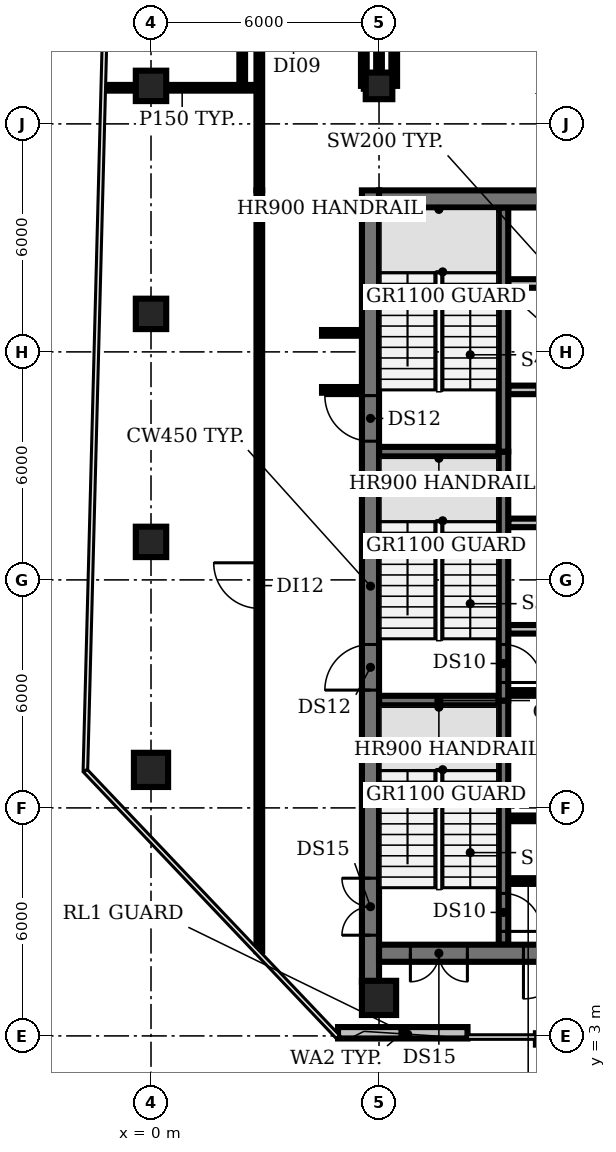
"""IFC4 building model, lengths in metres.
Left out: names, types, materials, properties, quantities, classifications, styles, units other than length and angle.
Written with IfcOpenShell. Run it as: python <this file> out.ifc"""

import sys

from ifc_helpers import new_model, si_unit, direction, frame, frame_2d, origin, origin_2d, place, context, subcontext, project, spatial, rectangle, circle, extrude, element, fill, save


model = new_model("IFC4")
c1 = context("Model", 3, precision=1e-05, world=origin(), true_north=direction((0.0, 1.0)))
c2 = subcontext(c1, "Body", "Model", "MODEL_VIEW")
j1 = project(units=[si_unit("LENGTHUNIT", "METRE"), si_unit("PLANEANGLEUNIT", "RADIAN")], contexts=[c1])
p1 = place(None, origin())
s1 = spatial("IfcSite", under=j1, at=p1, CompositionType="ELEMENT")
p2 = place(p1, origin())
s2 = spatial("IfcBuilding", under=s1, at=p2, CompositionType="ELEMENT")
p3 = place(p2, frame((0.0, 0.0, 234.8)))
s3 = spatial("IfcBuildingStorey", under=s2, at=p3, CompositionType="ELEMENT", Elevation=234.8)
p4 = place(p3, frame((0.0, 10.0, 0.0), z_axis=(0.0, 0.0, 1.0), x_axis=(1.0, 0.0, 0.0)))
e1 = element("IfcColumn", 1, at=p4, inside=s3, PredefinedType="COLUMN", context=c2, shape_type="SweptSolid", body=[
    extrude(circle(Radius=0.45, at=origin_2d()), origin(), (0.0, 0.0, 1.0), 3.85),
])
for number, where, z_axis, x_axis in (
    (2, (0.0, 16.0, 0.0), (0.0, 0.0, 1.0), (1.0, 0.0, 0.0)),
    (3, (0.0, 22.0, 0.0), (0.0, 0.0, 1.0), (1.0, 0.0, 0.0)),
    (4, (0.0, 28.0, 0.0), (0.0, 0.0, 1.0), (1.0, 0.0, 0.0)),
):
    element("IfcColumn", number, at=place(p3, frame(where, z_axis=z_axis, x_axis=x_axis)), inside=s3, PredefinedType="COLUMN", context=c2, shape_type="SweptSolid", body=[
        extrude(rectangle(XDim=0.8, YDim=0.8, at=origin_2d()), origin(), (0.0, 0.0, 1.0), 3.85),
    ])
p5 = place(p3, frame((6.0, 4.0, 0.0), z_axis=(0.0, 0.0, 1.0), x_axis=(1.0, 0.0, 0.0)))
e5 = element("IfcColumn", 5, at=p5, inside=s3, PredefinedType="COLUMN", context=c2, shape_type="SweptSolid", body=[
    extrude(circle(Radius=0.45, at=origin_2d()), origin(), (0.0, 0.0, 1.0), 3.85),
])
p6 = place(p3, frame((6.0, 28.0, 0.0), z_axis=(0.0, 0.0, 1.0), x_axis=(1.0, 0.0, 0.0)))
e6 = element("IfcColumn", 6, at=p6, inside=s3, PredefinedType="COLUMN", context=c2, shape_type="SweptSolid", body=[
    extrude(rectangle(XDim=0.7, YDim=0.7, at=origin_2d()), origin(), (0.0, 0.0, 1.0), 3.85),
])
p7 = place(p3, frame((4.921, 3.083, 0.0), z_axis=(0.0, 0.0, 1.0), x_axis=(1.0, 0.0, 0.0)))
e7 = element("IfcWall", 7, at=p7, inside=s3, PredefinedType="SOLIDWALL", context=c2, shape_type="SweptSolid", body=[
    extrude(rectangle(XDim=3.407, YDim=0.3, at=frame_2d((1.704, 0.0))), origin(), (0.0, 0.0, 1.0), 3.85),
])
p8 = place(p3, frame((10.128, 2.92, 0.0), z_axis=(0.0, 0.0, 1.0), x_axis=(1.0, 0.0, 0.0)))
e8 = element("IfcWall", 8, at=p8, inside=s3, PredefinedType="SOLIDWALL", context=c2, shape_type="SweptSolid", body=[
    extrude(rectangle(XDim=3.407, YDim=0.3, at=frame_2d((1.704, 0.0))), origin(), (0.0, 0.0, 1.0), 3.85),
])
for number, where, z_axis, x_axis in (
    (9, (9.4, 7.075, 0.0), (0.0, 0.0, 1.0), (1.0, 0.0, 0.0)),
    (10, (9.4, 8.725, 0.0), (0.0, 0.0, 1.0), (1.0, 0.0, 0.0)),
    (11, (9.4, 10.375, 0.0), (0.0, 0.0, 1.0), (1.0, 0.0, 0.0)),
):
    element("IfcWall", number, at=place(p3, frame(where, z_axis=z_axis, x_axis=x_axis)), inside=s3, PredefinedType="SHEAR", context=c2, shape_type="SweptSolid", body=[
        extrude(rectangle(XDim=1.05, YDim=0.15, at=frame_2d((0.525, 0.0))), origin(), (0.0, 0.0, 1.0), 3.85),
    ])
p9 = place(p3, frame((6.0, 11.825, 0.0), z_axis=(0.0, 0.0, 1.0), x_axis=(1.0, 0.0, 0.0)))
e12 = element("IfcWall", 12, at=p9, inside=s3, PredefinedType="SHEAR", context=c2, shape_type="SweptSolid", body=[
    extrude(rectangle(XDim=3.15, YDim=0.25, at=frame_2d((1.575, 0.0))), origin(), (0.0, 0.0, 1.0), 3.85),
])
p10 = place(p3, frame((9.4, 12.025, 0.0), z_axis=(0.0, 0.0, 1.0), x_axis=(1.0, 0.0, 0.0)))
e13 = element("IfcWall", 13, at=p10, inside=s3, PredefinedType="SHEAR", context=c2, shape_type="SweptSolid", body=[
    extrude(rectangle(XDim=1.05, YDim=0.15, at=frame_2d((0.525, 0.0))), origin(), (0.0, 0.0, 1.0), 3.85),
])
p11 = place(p3, frame((9.4, 13.7, 0.0), z_axis=(0.0, 0.0, 1.0), x_axis=(1.0, 0.0, 0.0)))
e14 = element("IfcWall", 14, at=p11, inside=s3, PredefinedType="PARTITIONING", context=c2, shape_type="SweptSolid", body=[
    extrude(rectangle(XDim=4.0, YDim=0.225, at=frame_2d((2.0, 0.0))), origin(), (0.0, 0.0, 1.0), 3.85),
])
p12 = place(p3, frame((9.4, 16.5, 0.0), z_axis=(0.0, 0.0, 1.0), x_axis=(1.0, 0.0, 0.0)))
e15 = element("IfcWall", 15, at=p12, inside=s3, PredefinedType="PARTITIONING", context=c2, shape_type="SweptSolid", body=[
    extrude(rectangle(XDim=14.6, YDim=0.225, at=frame_2d((7.3, 0.0))), origin(), (0.0, 0.0, 1.0), 3.85),
])
p13 = place(p12, frame((1.6, 0.0, 0.0)))
e16 = element("IfcOpeningElement", 16, at=p13, cuts=e15, PredefinedType="OPENING", context=c2, shape_type="SweptSolid", body=[
    extrude(rectangle(XDim=1.0, YDim=2.1, at=frame_2d((0.5, 1.05))), frame((0.0, 0.123, 0.0), z_axis=(0.0, -1.0, 0.0), x_axis=(1.0, 0.0, 0.0)), (0.0, 0.0, 1.0), 0.245),
])
p14 = place(p12, frame((5.125, 0.0, 0.0)))
e17 = element("IfcOpeningElement", 17, at=p14, cuts=e15, PredefinedType="OPENING", context=c2, shape_type="SweptSolid", body=[
    extrude(rectangle(XDim=0.9, YDim=2.1, at=frame_2d((0.45, 1.05))), frame((0.0, 0.123, 0.0), z_axis=(0.0, -1.0, 0.0), x_axis=(1.0, 0.0, 0.0)), (0.0, 0.0, 1.0), 0.245),
])
p15 = place(p12, frame((7.675, 0.0, 0.0)))
e18 = element("IfcOpeningElement", 18, at=p15, cuts=e15, PredefinedType="OPENING", context=c2, shape_type="SweptSolid", body=[
    extrude(rectangle(XDim=0.9, YDim=2.1, at=frame_2d((0.45, 1.05))), frame((0.0, 0.123, 0.0), z_axis=(0.0, -1.0, 0.0), x_axis=(1.0, 0.0, 0.0)), (0.0, 0.0, 1.0), 0.245),
])
p16 = place(p12, frame((9.775, 0.0, 0.0)))
e19 = element("IfcOpeningElement", 19, at=p16, cuts=e15, PredefinedType="OPENING", context=c2, shape_type="SweptSolid", body=[
    extrude(rectangle(XDim=0.9, YDim=2.1, at=frame_2d((0.45, 1.05))), frame((0.0, 0.123, 0.0), z_axis=(0.0, -1.0, 0.0), x_axis=(1.0, 0.0, 0.0)), (0.0, 0.0, 1.0), 0.245),
])
p17 = place(p12, frame((12.4, 0.0, 0.0)))
e20 = element("IfcOpeningElement", 20, at=p17, cuts=e15, PredefinedType="OPENING", context=c2, shape_type="SweptSolid", body=[
    extrude(rectangle(XDim=1.0, YDim=2.1, at=frame_2d((0.5, 1.05))), frame((0.0, 0.123, 0.0), z_axis=(0.0, -1.0, 0.0), x_axis=(1.0, 0.0, 0.0)), (0.0, 0.0, 1.0), 0.245),
])
p18 = place(p3, frame((6.0, 18.375, 0.0), z_axis=(0.0, 0.0, 1.0), x_axis=(1.0, 0.0, 0.0)))
e21 = element("IfcWall", 21, at=p18, inside=s3, PredefinedType="SHEAR", context=c2, shape_type="SweptSolid", body=[
    extrude(rectangle(XDim=3.15, YDim=0.25, at=frame_2d((1.575, 0.0))), origin(), (0.0, 0.0, 1.0), 3.85),
])
p19 = place(p3, frame((24.0, 20.0, 0.0), z_axis=(0.0, 0.0, 1.0), x_axis=(-1.0, 0.0, 0.0)))
e22 = element("IfcWall", 22, at=p19, inside=s3, PredefinedType="PARTITIONING", context=c2, shape_type="SweptSolid", body=[
    extrude(rectangle(XDim=14.6, YDim=0.225, at=frame_2d((7.3, 0.0))), origin(), (0.0, 0.0, 1.0), 3.85),
])
p20 = place(p19, frame((12.75, 0.0, 0.0)))
e23 = element("IfcOpeningElement", 23, at=p20, cuts=e22, PredefinedType="OPENING", context=c2, shape_type="SweptSolid", body=[
    extrude(rectangle(XDim=1.1, YDim=2.1, at=frame_2d((0.55, 1.05))), frame((0.0, 0.123, 0.0), z_axis=(0.0, -1.0, 0.0), x_axis=(1.0, 0.0, 0.0)), (0.0, 0.0, 1.0), 0.245),
])
p21 = place(p19, frame((9.95, 0.0, 0.0)))
e24 = element("IfcOpeningElement", 24, at=p21, cuts=e22, PredefinedType="OPENING", context=c2, shape_type="SweptSolid", body=[
    extrude(rectangle(XDim=1.1, YDim=2.1, at=frame_2d((0.55, 1.05))), frame((0.0, 0.123, 0.0), z_axis=(0.0, -1.0, 0.0), x_axis=(1.0, 0.0, 0.0)), (0.0, 0.0, 1.0), 0.245),
])
p22 = place(p19, frame((7.15, 0.0, 0.0)))
e25 = element("IfcOpeningElement", 25, at=p22, cuts=e22, PredefinedType="OPENING", context=c2, shape_type="SweptSolid", body=[
    extrude(rectangle(XDim=1.1, YDim=2.1, at=frame_2d((0.55, 1.05))), frame((0.0, 0.123, 0.0), z_axis=(0.0, -1.0, 0.0), x_axis=(1.0, 0.0, 0.0)), (0.0, 0.0, 1.0), 0.245),
])
p23 = place(p19, frame((4.35, 0.0, 0.0)))
e26 = element("IfcOpeningElement", 26, at=p23, cuts=e22, PredefinedType="OPENING", context=c2, shape_type="SweptSolid", body=[
    extrude(rectangle(XDim=1.1, YDim=2.1, at=frame_2d((0.55, 1.05))), frame((0.0, 0.123, 0.0), z_axis=(0.0, -1.0, 0.0), x_axis=(1.0, 0.0, 0.0)), (0.0, 0.0, 1.0), 0.245),
])
p24 = place(p19, frame((1.2, 0.0, 0.0)))
e27 = element("IfcOpeningElement", 27, at=p24, cuts=e22, PredefinedType="OPENING", context=c2, shape_type="SweptSolid", body=[
    extrude(rectangle(XDim=1.0, YDim=2.1, at=frame_2d((0.5, 1.05))), frame((0.0, 0.123, 0.0), z_axis=(0.0, -1.0, 0.0), x_axis=(1.0, 0.0, 0.0)), (0.0, 0.0, 1.0), 0.245),
])
p25 = place(p3, frame((9.4, 22.8, 0.0), z_axis=(0.0, 0.0, 1.0), x_axis=(1.0, 0.0, 0.0)))
e28 = element("IfcWall", 28, at=p25, inside=s3, PredefinedType="PARTITIONING", context=c2, shape_type="SweptSolid", body=[
    extrude(rectangle(XDim=14.6, YDim=0.225, at=frame_2d((7.3, 0.0))), origin(), (0.0, 0.0, 1.0), 3.85),
])
p26 = place(p3, frame((9.275, 11.825, 0.0), z_axis=(0.0, 0.0, 1.0), x_axis=(0.0, -1.0, 0.0)))
e29 = element("IfcWall", 29, at=p26, inside=s3, PredefinedType="SHEAR", context=c2, shape_type="SweptSolid", body=[
    extrude(rectangle(XDim=6.425, YDim=0.25, at=frame_2d((3.212, 0.0))), origin(), (0.0, 0.0, 1.0), 3.85),
])
p27 = place(p26, frame((5.075, 0.0, 0.0)))
e30 = element("IfcOpeningElement", 30, at=p27, cuts=e29, PredefinedType="OPENING", context=c2, shape_type="SweptSolid", body=[
    extrude(rectangle(XDim=1.0, YDim=2.1, at=frame_2d((0.5, 1.05))), frame((0.0, 0.135, 0.0), z_axis=(0.0, -1.0, 0.0), x_axis=(1.0, 0.0, 0.0)), (0.0, 0.0, 1.0), 0.27),
])
p28 = place(p3, frame((9.275, 18.375, 0.0), z_axis=(0.0, 0.0, 1.0), x_axis=(0.0, -1.0, 0.0)))
e31 = element("IfcWall", 31, at=p28, inside=s3, PredefinedType="SHEAR", context=c2, shape_type="SweptSolid", body=[
    extrude(rectangle(XDim=6.55, YDim=0.25, at=frame_2d((3.275, 0.0))), origin(), (0.0, 0.0, 1.0), 3.85),
])
p29 = place(p28, frame((5.075, 0.0, 0.0)))
e32 = element("IfcOpeningElement", 32, at=p29, cuts=e31, PredefinedType="OPENING", context=c2, shape_type="SweptSolid", body=[
    extrude(rectangle(XDim=1.0, YDim=2.1, at=frame_2d((0.5, 1.05))), frame((0.0, 0.135, 0.0), z_axis=(0.0, -1.0, 0.0), x_axis=(1.0, 0.0, 0.0)), (0.0, 0.0, 1.0), 0.27),
])
p30 = place(p3, frame((9.275, 18.375, 0.0), z_axis=(0.0, 0.0, 1.0), x_axis=(0.0, 1.0, 0.0)))
e33 = element("IfcWall", 33, at=p30, inside=s3, PredefinedType="SHEAR", context=c2, shape_type="SweptSolid", body=[
    extrude(rectangle(XDim=6.425, YDim=0.25, at=frame_2d((3.212, 0.0))), origin(), (0.0, 0.0, 1.0), 3.85),
])
p31 = place(p3, frame((5.775, 4.42, 0.0), z_axis=(0.0, 0.0, 1.0), x_axis=(0.0, 1.0, 0.0)))
e34 = element("IfcWall", 34, at=p31, inside=s3, PredefinedType="SHEAR", context=c2, shape_type="SweptSolid", body=[
    extrude(rectangle(XDim=20.83, YDim=0.45, at=frame_2d((10.415, 0.0))), origin(), (0.0, 0.0, 1.0), 3.85),
])
p32 = place(p31, frame((1.23, 0.0, 0.0)))
e35 = element("IfcOpeningElement", 35, at=p32, cuts=e34, PredefinedType="OPENING", context=c2, shape_type="SweptSolid", body=[
    extrude(rectangle(XDim=1.5, YDim=2.1, at=frame_2d((0.75, 1.05))), frame((0.0, 0.235, 0.0), z_axis=(0.0, -1.0, 0.0), x_axis=(1.0, 0.0, 0.0)), (0.0, 0.0, 1.0), 0.47),
])
p33 = place(p31, frame((7.68, 0.0, 0.0)))
e36 = element("IfcOpeningElement", 36, at=p33, cuts=e34, PredefinedType="OPENING", context=c2, shape_type="SweptSolid", body=[
    extrude(rectangle(XDim=1.2, YDim=2.1, at=frame_2d((0.6, 1.05))), frame((0.0, 0.235, 0.0), z_axis=(0.0, -1.0, 0.0), x_axis=(1.0, 0.0, 0.0)), (0.0, 0.0, 1.0), 0.47),
])
p34 = place(p31, frame((14.23, 0.0, 0.0)))
e37 = element("IfcOpeningElement", 37, at=p34, cuts=e34, PredefinedType="OPENING", context=c2, shape_type="SweptSolid", body=[
    extrude(rectangle(XDim=1.2, YDim=2.1, at=frame_2d((0.6, 1.05))), frame((0.0, 0.235, 0.0), z_axis=(0.0, -1.0, 0.0), x_axis=(1.0, 0.0, 0.0)), (0.0, 0.0, 1.0), 0.47),
])
p35 = place(p3, frame((24.0, 5.175, 0.0), z_axis=(0.0, 0.0, 1.0), x_axis=(-1.0, 0.0, 0.0)))
e38 = element("IfcWall", 38, at=p35, inside=s3, PredefinedType="SHEAR", context=c2, shape_type="SweptSolid", body=[
    extrude(rectangle(XDim=18.0, YDim=0.45, at=frame_2d((9.0, 0.0))), origin(), (0.0, 0.0, 1.0), 3.85),
])
p36 = place(p35, frame((0.825, 0.0, 0.0)))
e39 = element("IfcOpeningElement", 39, at=p36, cuts=e38, PredefinedType="OPENING", context=c2, shape_type="SweptSolid", body=[
    extrude(rectangle(XDim=1.5, YDim=2.1, at=frame_2d((0.75, 1.05))), frame((0.0, 0.235, 0.0), z_axis=(0.0, -1.0, 0.0), x_axis=(1.0, 0.0, 0.0)), (0.0, 0.0, 1.0), 0.47),
])
p37 = place(p35, frame((15.675, 0.0, 0.0)))
e40 = element("IfcOpeningElement", 40, at=p37, cuts=e38, PredefinedType="OPENING", context=c2, shape_type="SweptSolid", body=[
    extrude(rectangle(XDim=1.5, YDim=2.1, at=frame_2d((0.75, 1.05))), frame((0.0, 0.235, 0.0), z_axis=(0.0, -1.0, 0.0), x_axis=(1.0, 0.0, 0.0)), (0.0, 0.0, 1.0), 0.47),
])
p38 = place(p35, frame((13.0, 0.0, 0.0)))
e41 = element("IfcOpeningElement", 41, at=p38, cuts=e38, PredefinedType="OPENING", context=c2, shape_type="SweptSolid", body=[
    extrude(rectangle(XDim=1.2, YDim=2.1, at=frame_2d((0.6, 1.05))), frame((0.0, 0.235, 0.0), z_axis=(0.0, -1.0, 0.0), x_axis=(1.0, 0.0, 0.0)), (0.0, 0.0, 1.0), 0.47),
])
p39 = place(p35, frame((4.4, 0.0, 0.0)))
e42 = element("IfcOpeningElement", 42, at=p39, cuts=e38, PredefinedType="OPENING", context=c2, shape_type="SweptSolid", body=[
    extrude(rectangle(XDim=1.0, YDim=2.1, at=frame_2d((0.5, 1.05))), frame((0.0, 0.235, 0.0), z_axis=(0.0, -1.0, 0.0), x_axis=(1.0, 0.0, 0.0)), (0.0, 0.0, 1.0), 0.47),
])
p40 = place(p3, frame((6.0, 25.025, 0.0), z_axis=(0.0, 0.0, 1.0), x_axis=(1.0, 0.0, 0.0)))
e43 = element("IfcWall", 43, at=p40, inside=s3, PredefinedType="SHEAR", context=c2, shape_type="SweptSolid", body=[
    extrude(rectangle(XDim=18.0, YDim=0.45, at=frame_2d((9.0, 0.0))), origin(), (0.0, 0.0, 1.0), 3.85),
])
p41 = place(p3, frame((-1.21, 27.95, 0.0), z_axis=(0.0, 0.0, 1.0), x_axis=(1.0, 0.0, 0.0)))
e44 = element("IfcWall", 44, at=p41, inside=s3, PredefinedType="PARTITIONING", context=c2, shape_type="SweptSolid", body=[
    extrude(rectangle(XDim=4.06, YDim=0.15, at=frame_2d((2.03, 0.0))), origin(), (0.0, 0.0, 1.0), 2.88),
])
p42 = place(p3, frame((2.4, 27.95, 0.0), z_axis=(0.0, 0.0, 1.0), x_axis=(0.0, 1.0, 0.0)))
e45 = element("IfcWall", 45, at=p42, inside=s3, PredefinedType="PARTITIONING", context=c2, shape_type="SweptSolid", body=[
    extrude(rectangle(XDim=6.0, YDim=0.15, at=frame_2d((3.0, 0.0))), origin(), (0.0, 0.0, 1.0), 2.88),
])
p43 = place(p3, frame((2.85, 5.23, 0.0), z_axis=(0.0, 0.0, 1.0), x_axis=(0.0, 1.0, 0.0)))
e46 = element("IfcWall", 46, at=p43, inside=s3, PredefinedType="PARTITIONING", context=c2, shape_type="SweptSolid", body=[
    extrude(rectangle(XDim=20.02, YDim=0.15, at=frame_2d((10.01, 0.0))), origin(), (0.0, 0.0, 1.0), 2.88),
])
p44 = place(p43, frame((9.02, 0.0, 0.0)))
e47 = element("IfcOpeningElement", 47, at=p44, cuts=e46, PredefinedType="OPENING", context=c2, shape_type="SweptSolid", body=[
    extrude(rectangle(XDim=1.2, YDim=2.1, at=frame_2d((0.6, 1.05))), frame((0.0, 0.085, 0.0), z_axis=(0.0, -1.0, 0.0), x_axis=(1.0, 0.0, 0.0)), (0.0, 0.0, 1.0), 0.17),
])
p45 = place(p3, frame((2.85, 25.25, 0.0), z_axis=(0.0, 0.0, 1.0), x_axis=(0.0, 1.0, 0.0)))
e48 = element("IfcWall", 48, at=p45, inside=s3, PredefinedType="PARTITIONING", context=c2, shape_type="SweptSolid", body=[
    extrude(rectangle(XDim=3.9, YDim=0.15, at=frame_2d((1.95, 0.0))), origin(), (0.0, 0.0, 1.0), 2.88),
])
for number, where, z_axis, x_axis in (
    (49, (4.5, 20.0, 0.0), (0.0, 0.0, 1.0), (1.0, 0.0, 0.0)),
    (50, (4.5, 21.5, 0.0), (0.0, 0.0, 1.0), (1.0, 0.0, 0.0)),
):
    element("IfcWall", number, at=place(p3, frame(where, z_axis=z_axis, x_axis=x_axis)), inside=s3, PredefinedType="PARTITIONING", context=c2, shape_type="SweptSolid", body=[
        extrude(rectangle(XDim=1.05, YDim=0.15, at=frame_2d((0.525, 0.0))), origin(), (0.0, 0.0, 1.0), 2.88),
    ])
p46 = place(p3, frame((5.6, 28.0, 0.0), z_axis=(0.0, 0.0, 1.0), x_axis=(0.0, 1.0, 0.0)))
e51 = element("IfcWall", 51, at=p46, inside=s3, PredefinedType="PARTITIONING", context=c2, shape_type="SweptSolid", body=[
    extrude(rectangle(XDim=1.15, YDim=0.15, at=frame_2d((0.575, 0.0))), origin(), (0.0, 0.0, 1.0), 2.88),
])
p47 = place(p3, frame((5.6, 28.0, 0.0), z_axis=(0.0, 0.0, 1.0), x_axis=(1.0, 0.0, 0.0)))
e52 = element("IfcWall", 52, at=p47, inside=s3, PredefinedType="PARTITIONING", context=c2, shape_type="SweptSolid", body=[
    extrude(rectangle(XDim=0.4, YDim=0.15, at=frame_2d((0.2, 0.0))), origin(), (0.0, 0.0, 1.0), 2.88),
])
p48 = place(p3, frame((6.0, 28.0, 0.0), z_axis=(0.0, 0.0, 1.0), x_axis=(0.0, 1.0, 0.0)))
e53 = element("IfcWall", 53, at=p48, inside=s3, PredefinedType="PARTITIONING", context=c2, shape_type="SweptSolid", body=[
    extrude(rectangle(XDim=5.95, YDim=0.15, at=frame_2d((2.975, 0.0))), origin(), (0.0, 0.0, 1.0), 2.88),
])
p49 = place(p3, frame((6.4, 28.0, 0.0), z_axis=(0.0, 0.0, 1.0), x_axis=(0.0, 1.0, 0.0)))
e54 = element("IfcWall", 54, at=p49, inside=s3, PredefinedType="PARTITIONING", context=c2, shape_type="SweptSolid", body=[
    extrude(rectangle(XDim=1.15, YDim=0.15, at=frame_2d((0.575, 0.0))), origin(), (0.0, 0.0, 1.0), 2.88),
])
p50 = place(p27, origin())
e55 = element("IfcDoor", 55, at=p50, inside=s3, OperationType="SINGLE_SWING_RIGHT", PredefinedType="DOOR", context=c2, shape_type="SweptSolid", body=[
    extrude(rectangle(XDim=1.0, YDim=2.1, at=frame_2d((0.5, 1.05))), frame((0.0, 0.025, 0.0), z_axis=(0.0, -1.0, 0.0), x_axis=(1.0, 0.0, 0.0)), (0.0, 0.0, 1.0), 0.05),
])
fill(e30, e55)
p51 = place(p29, origin())
e56 = element("IfcDoor", 56, at=p51, inside=s3, OperationType="SINGLE_SWING_RIGHT", PredefinedType="DOOR", context=c2, shape_type="SweptSolid", body=[
    extrude(rectangle(XDim=1.0, YDim=2.1, at=frame_2d((0.5, 1.05))), frame((0.0, 0.025, 0.0), z_axis=(0.0, -1.0, 0.0), x_axis=(1.0, 0.0, 0.0)), (0.0, 0.0, 1.0), 0.05),
])
fill(e32, e56)
p52 = place(p32, origin())
e57 = element("IfcDoor", 57, at=p52, inside=s3, OperationType="DOUBLE_DOOR_SINGLE_SWING", PredefinedType="DOOR", context=c2, shape_type="SweptSolid", body=[
    extrude(rectangle(XDim=1.5, YDim=2.1, at=frame_2d((0.75, 1.05))), frame((0.0, 0.025, 0.0), z_axis=(0.0, -1.0, 0.0), x_axis=(1.0, 0.0, 0.0)), (0.0, 0.0, 1.0), 0.05),
])
fill(e35, e57)
p53 = place(p33, origin())
e58 = element("IfcDoor", 58, at=p53, inside=s3, OperationType="SINGLE_SWING_LEFT", PredefinedType="DOOR", context=c2, shape_type="SweptSolid", body=[
    extrude(rectangle(XDim=1.2, YDim=2.1, at=frame_2d((0.6, 1.05))), frame((0.0, 0.025, 0.0), z_axis=(0.0, -1.0, 0.0), x_axis=(1.0, 0.0, 0.0)), (0.0, 0.0, 1.0), 0.05),
])
fill(e36, e58)
p54 = place(p34, origin())
e59 = element("IfcDoor", 59, at=p54, inside=s3, OperationType="SINGLE_SWING_RIGHT", PredefinedType="DOOR", context=c2, shape_type="SweptSolid", body=[
    extrude(rectangle(XDim=1.2, YDim=2.1, at=frame_2d((0.6, 1.05))), frame((0.0, 0.025, 0.0), z_axis=(0.0, -1.0, 0.0), x_axis=(1.0, 0.0, 0.0)), (0.0, 0.0, 1.0), 0.05),
])
fill(e37, e59)
p55 = place(p37, origin())
e60 = element("IfcDoor", 60, at=p55, inside=s3, OperationType="DOUBLE_DOOR_SINGLE_SWING", PredefinedType="DOOR", context=c2, shape_type="SweptSolid", body=[
    extrude(rectangle(XDim=1.5, YDim=2.1, at=frame_2d((0.75, 1.05))), frame((0.0, 0.025, 0.0), z_axis=(0.0, -1.0, 0.0), x_axis=(1.0, 0.0, 0.0)), (0.0, 0.0, 1.0), 0.05),
])
fill(e40, e60)
p56 = place(p38, origin())
e61 = element("IfcDoor", 61, at=p56, inside=s3, OperationType="SINGLE_SWING_RIGHT", PredefinedType="DOOR", context=c2, shape_type="SweptSolid", body=[
    extrude(rectangle(XDim=1.2, YDim=2.1, at=frame_2d((0.6, 1.05))), frame((0.0, 0.025, 0.0), z_axis=(0.0, -1.0, 0.0), x_axis=(1.0, 0.0, 0.0)), (0.0, 0.0, 1.0), 0.05),
])
fill(e41, e61)
p57 = place(p44, origin())
e62 = element("IfcDoor", 62, at=p57, inside=s3, OperationType="SINGLE_SWING_RIGHT", PredefinedType="DOOR", context=c2, shape_type="SweptSolid", body=[
    extrude(rectangle(XDim=1.2, YDim=2.1, at=frame_2d((0.6, 1.05))), frame((0.0, 0.025, 0.0), z_axis=(0.0, -1.0, 0.0), x_axis=(1.0, 0.0, 0.0)), (0.0, 0.0, 1.0), 0.05),
])
fill(e47, e62)
save(model, sys.argv[1])
